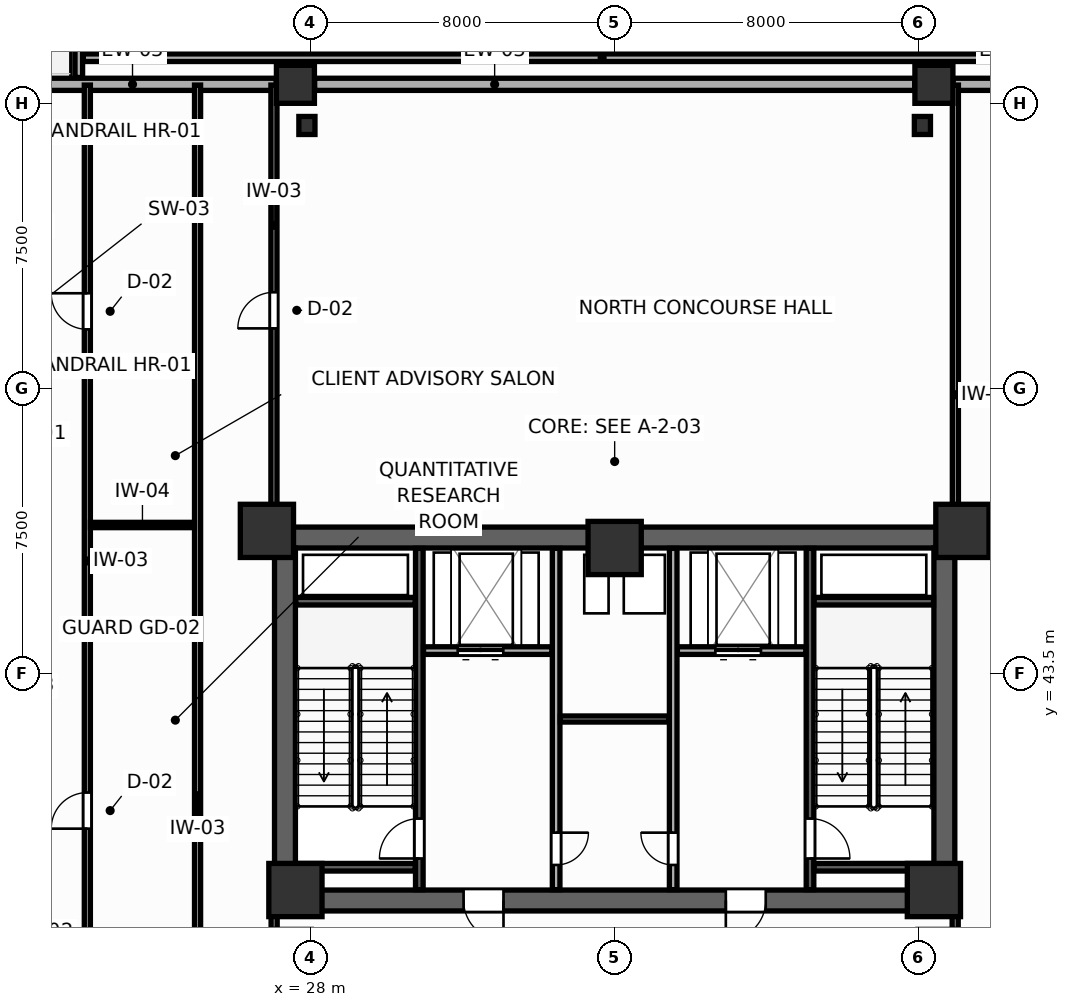
"""IFC4 building model, lengths in metres.
Left out: names, types, materials, properties, quantities, classifications, styles, units other than length and angle.
Written with IfcOpenShell. Run it as: python <this file> out.ifc"""

import sys

from ifc_helpers import new_model, si_unit, direction, frame, frame_2d, origin, origin_2d, place, context, subcontext, project, spatial, rectangle, i_section, extrude, source, transform, mapped, element, fill, save


model = new_model("IFC4")
c1 = context("Model", 3, precision=1e-05, world=origin(), true_north=direction((0.0, 1.0)))
c2 = subcontext(c1, "Body", "Model", "MODEL_VIEW")
j1 = project(units=[si_unit("LENGTHUNIT", "METRE"), si_unit("PLANEANGLEUNIT", "RADIAN")], contexts=[c1])
p1 = place(None, origin())
s1 = spatial("IfcSite", under=j1, at=p1, CompositionType="ELEMENT")
p2 = place(p1, origin())
s2 = spatial("IfcBuilding", under=s1, at=p2, CompositionType="ELEMENT")
p3 = place(p2, origin())
s3 = spatial("IfcBuildingStorey", under=s2, at=p3, CompositionType="ELEMENT", Elevation=0.0)
p4 = place(p3, frame((27.05, 47.075, 0.0), z_axis=(0.0, 0.0, 1.0), x_axis=(1.0, 0.0, 0.0)))
e1 = element("IfcWall", 1, at=p4, inside=s3, PredefinedType="SHEAR", context=c2, shape_type="SweptSolid", body=[
    extrude(rectangle(XDim=17.9, YDim=0.55, at=frame_2d((8.95, 0.0))), origin(), (0.0, 0.0, 1.0), 4.8),
])
p5 = place(p3, frame((27.05, 37.525, 0.0), z_axis=(0.0, 0.0, 1.0), x_axis=(1.0, 0.0, 0.0)))
e2 = element("IfcWall", 2, at=p5, inside=s3, PredefinedType="SHEAR", context=c2, shape_type="SweptSolid", body=[
    extrude(rectangle(XDim=17.9, YDim=0.55, at=frame_2d((8.95, 0.0))), origin(), (0.0, 0.0, 1.0), 4.8),
])
p6 = place(p5, frame((4.975, 0.0, 0.0)))
e3 = element("IfcOpeningElement", 3, at=p6, cuts=e2, PredefinedType="OPENING", context=c2, shape_type="SweptSolid", body=[
    extrude(rectangle(XDim=1.05, YDim=2.1, at=frame_2d((0.525, 1.05))), frame((0.0, 0.285, 0.0), z_axis=(0.0, -1.0, 0.0), x_axis=(1.0, 0.0, 0.0)), (0.0, 0.0, 1.0), 0.57),
])
p7 = place(p5, frame((11.875, 0.0, 0.0)))
e4 = element("IfcOpeningElement", 4, at=p7, cuts=e2, PredefinedType="OPENING", context=c2, shape_type="SweptSolid", body=[
    extrude(rectangle(XDim=1.05, YDim=2.1, at=frame_2d((0.525, 1.05))), frame((0.0, 0.285, 0.0), z_axis=(0.0, -1.0, 0.0), x_axis=(1.0, 0.0, 0.0)), (0.0, 0.0, 1.0), 0.57),
])
for number, where, z_axis, x_axis in (
    (5, (27.325, 37.8, 0.0), (0.0, 0.0, 1.0), (0.0, 1.0, 0.0)),
    (6, (44.675, 37.8, 0.0), (0.0, 0.0, 1.0), (0.0, 1.0, 0.0)),
):
    element("IfcWall", number, at=place(p3, frame(where, z_axis=z_axis, x_axis=x_axis)), inside=s3, PredefinedType="SHEAR", context=c2, shape_type="SweptSolid", body=[
        extrude(rectangle(XDim=9.0, YDim=0.55, at=frame_2d((4.5, 0.0))), origin(), (0.0, 0.0, 1.0), 4.8),
    ])
m1 = source(origin(), c2, "Body", "SweptSolid", [
    extrude(rectangle(XDim=1.4, YDim=1.4, at=origin_2d()), origin(), (0.0, 0.0, 1.0), 4.8),
])
for number, where, z_axis, x_axis in (
    (7, (26.85, 47.25, 0.0), (0.0, 0.0, 1.0), (1.0, 0.0, 0.0)),
    (8, (45.15, 47.25, 0.0), (0.0, 0.0, 1.0), (1.0, 0.0, 0.0)),
    (9, (27.6, 37.8, 0.0), (0.0, 0.0, 1.0), (1.0, 0.0, 0.0)),
    (10, (44.4, 37.8, 0.0), (0.0, 0.0, 1.0), (1.0, 0.0, 0.0)),
    (11, (36.0, 46.8, 0.0), (0.0, 0.0, 1.0), (1.0, 0.0, 0.0)),
):
    element("IfcColumn", number, at=place(p3, frame(where, z_axis=z_axis, x_axis=x_axis)), inside=s3, PredefinedType="COLUMN", context=c2, shape_type="MappedRepresentation", body=[
        mapped(m1, transform((0.0, 0.0, 0.0), scale=1.0)),
    ])
m2 = source(origin(), c2, "Body", "SweptSolid", [
    extrude(rectangle(XDim=1.0, YDim=1.0, at=origin_2d()), origin(), (0.0, 0.0, 1.0), 4.8),
])
for number, where, z_axis, x_axis in (
    (12, (27.6, 59.0, 0.0), (0.0, 0.0, 1.0), (1.0, 0.0, 0.0)),
    (13, (44.4, 59.0, 0.0), (0.0, 0.0, 1.0), (1.0, 0.0, 0.0)),
):
    element("IfcColumn", number, at=place(p3, frame(where, z_axis=z_axis, x_axis=x_axis)), inside=s3, PredefinedType="COLUMN", context=c2, shape_type="MappedRepresentation", body=[
        mapped(m2, transform((0.0, 0.0, 0.0), scale=1.0)),
    ])
m3 = source(origin(), c2, "Body", "SweptSolid", [
    extrude(i_section(OverallWidth=0.424, OverallDepth=0.474, WebThickness=0.045, FlangeThickness=0.072, FilletRadius=0.015, at=origin_2d()), origin(), (0.0, 0.0, 1.0), 4.8),
])
for number, where, z_axis, x_axis in (
    (14, (44.097, 57.917, 0.0), (0.0, 0.0, 1.0), (1.0, 0.0, 0.0)),
    (15, (27.903, 57.917, 0.0), (0.0, 0.0, 1.0), (1.0, 0.0, 0.0)),
):
    element("IfcColumn", number, at=place(p3, frame(where, z_axis=z_axis, x_axis=x_axis)), inside=s3, PredefinedType="COLUMN", context=c2, shape_type="MappedRepresentation", body=[
        mapped(m3, transform((0.0, 0.0, 0.0), scale=1.0)),
    ])
p8 = place(p3, frame((14.505, 59.0, 0.0), z_axis=(0.0, 0.0, 1.0), x_axis=(1.0, 0.0, 0.0)))
e16 = element("IfcWall", 16, at=p8, inside=s3, PredefinedType="SOLIDWALL", context=c2, shape_type="SweptSolid", body=[
    extrude(rectangle(XDim=12.59, YDim=0.32, at=frame_2d((6.295, 0.0))), origin(), (0.0, 0.0, 1.0), 3.82),
])
p9 = place(p8, frame((2.847, 0.0, 0.0)))
e17 = element("IfcOpeningElement", 17, at=p9, cuts=e16, PredefinedType="OPENING", context=c2, shape_type="SweptSolid", body=[
    extrude(rectangle(XDim=2.0, YDim=2.25, at=frame_2d((1.0, 1.125))), frame((0.0, 0.17, 0.0), z_axis=(0.0, -1.0, 0.0), x_axis=(1.0, 0.0, 0.0)), (0.0, 0.0, 1.0), 0.34),
])
p10 = place(p3, frame((28.105, 59.0, 0.0), z_axis=(0.0, 0.0, 1.0), x_axis=(1.0, 0.0, 0.0)))
e18 = element("IfcWall", 18, at=p10, inside=s3, PredefinedType="SOLIDWALL", context=c2, shape_type="SweptSolid", body=[
    extrude(rectangle(XDim=15.79, YDim=0.32, at=frame_2d((7.895, 0.0))), origin(), (0.0, 0.0, 1.0), 3.82),
])
p11 = place(p3, frame((44.905, 59.0, 0.0), z_axis=(0.0, 0.0, 1.0), x_axis=(1.0, 0.0, 0.0)))
e19 = element("IfcWall", 19, at=p11, inside=s3, PredefinedType="SOLIDWALL", context=c2, shape_type="SweptSolid", body=[
    extrude(rectangle(XDim=12.59, YDim=0.32, at=frame_2d((6.295, 0.0))), origin(), (0.0, 0.0, 1.0), 3.82),
])
p12 = place(p11, frame((5.195, 0.0, 0.75)))
e20 = element("IfcOpeningElement", 20, at=p12, cuts=e19, PredefinedType="OPENING", context=c2, shape_type="SweptSolid", body=[
    extrude(rectangle(XDim=2.2, YDim=2.0, at=frame_2d((1.1, 1.0))), frame((0.0, 0.17, 0.0), z_axis=(0.0, -1.0, 0.0), x_axis=(1.0, 0.0, 0.0)), (0.0, 0.0, 1.0), 0.34),
])
p13 = place(p3, frame((30.86, 37.81, 0.0), z_axis=(0.0, 0.0, 1.0), x_axis=(0.0, 1.0, 0.0)))
e21 = element("IfcWall", 21, at=p13, inside=s3, PredefinedType="SHEAR", context=c2, shape_type="SweptSolid", body=[
    extrude(rectangle(XDim=8.98, YDim=0.2, at=frame_2d((4.49, 0.0))), origin(), (0.0, 0.0, 1.0), 4.8),
])
p14 = place(p13, frame((0.82, 0.0, 0.0)))
e22 = element("IfcOpeningElement", 22, at=p14, cuts=e21, PredefinedType="OPENING", context=c2, shape_type="SweptSolid", body=[
    extrude(rectangle(XDim=1.05, YDim=2.1, at=frame_2d((0.525, 1.05))), frame((0.0, 0.11, 0.0), z_axis=(0.0, -1.0, 0.0), x_axis=(1.0, 0.0, 0.0)), (0.0, 0.0, 1.0), 0.22),
])
for number, where, z_axis, x_axis in (
    (23, (27.61, 45.4, 0.0), (0.0, 0.0, 1.0), (1.0, 0.0, 0.0)),
    (24, (27.61, 38.4, 0.0), (0.0, 0.0, 1.0), (1.0, 0.0, 0.0)),
):
    element("IfcWall", number, at=place(p3, frame(where, z_axis=z_axis, x_axis=x_axis)), inside=s3, PredefinedType="SHEAR", context=c2, shape_type="SweptSolid", body=[
        extrude(rectangle(XDim=3.14, YDim=0.2, at=frame_2d((1.57, 0.0))), origin(), (0.0, 0.0, 1.0), 4.8),
    ])
p15 = place(p3, frame((41.14, 37.81, 0.0), z_axis=(0.0, 0.0, 1.0), x_axis=(0.0, 1.0, 0.0)))
e25 = element("IfcWall", 25, at=p15, inside=s3, PredefinedType="SHEAR", context=c2, shape_type="SweptSolid", body=[
    extrude(rectangle(XDim=8.98, YDim=0.2, at=frame_2d((4.49, 0.0))), origin(), (0.0, 0.0, 1.0), 4.8),
])
p16 = place(p15, frame((0.82, 0.0, 0.0)))
e26 = element("IfcOpeningElement", 26, at=p16, cuts=e25, PredefinedType="OPENING", context=c2, shape_type="SweptSolid", body=[
    extrude(rectangle(XDim=1.05, YDim=2.1, at=frame_2d((0.525, 1.05))), frame((0.0, 0.11, 0.0), z_axis=(0.0, -1.0, 0.0), x_axis=(1.0, 0.0, 0.0)), (0.0, 0.0, 1.0), 0.22),
])
for number, where, z_axis, x_axis in (
    (27, (41.25, 45.4, 0.0), (0.0, 0.0, 1.0), (1.0, 0.0, 0.0)),
    (28, (41.25, 38.4, 0.0), (0.0, 0.0, 1.0), (1.0, 0.0, 0.0)),
):
    element("IfcWall", number, at=place(p3, frame(where, z_axis=z_axis, x_axis=x_axis)), inside=s3, PredefinedType="SHEAR", context=c2, shape_type="SweptSolid", body=[
        extrude(rectangle(XDim=3.14, YDim=0.2, at=frame_2d((1.57, 0.0))), origin(), (0.0, 0.0, 1.0), 4.8),
    ])
p17 = place(p3, frame((30.97, 44.1, 0.0), z_axis=(0.0, 0.0, 1.0), x_axis=(1.0, 0.0, 0.0)))
e29 = element("IfcWall", 29, at=p17, inside=s3, PredefinedType="PARTITIONING", context=c2, shape_type="SweptSolid", body=[
    extrude(rectangle(XDim=3.38, YDim=0.2, at=frame_2d((1.69, 0.0))), origin(), (0.0, 0.0, 1.0), 4.52),
])
p18 = place(p17, frame((0.9, 0.0, 0.0)))
e30 = element("IfcOpeningElement", 30, at=p18, cuts=e29, PredefinedType="OPENING", context=c2, shape_type="SweptSolid", body=[
    extrude(rectangle(XDim=1.2, YDim=2.1, at=frame_2d((0.6, 1.05))), frame((0.0, 0.11, 0.0), z_axis=(0.0, -1.0, 0.0), x_axis=(1.0, 0.0, 0.0)), (0.0, 0.0, 1.0), 0.22),
])
p19 = place(p3, frame((37.65, 44.1, 0.0), z_axis=(0.0, 0.0, 1.0), x_axis=(1.0, 0.0, 0.0)))
e31 = element("IfcWall", 31, at=p19, inside=s3, PredefinedType="PARTITIONING", context=c2, shape_type="SweptSolid", body=[
    extrude(rectangle(XDim=3.38, YDim=0.2, at=frame_2d((1.69, 0.0))), origin(), (0.0, 0.0, 1.0), 4.52),
])
p20 = place(p19, frame((1.0, 0.0, 0.0)))
e32 = element("IfcOpeningElement", 32, at=p20, cuts=e31, PredefinedType="OPENING", context=c2, shape_type="SweptSolid", body=[
    extrude(rectangle(XDim=1.2, YDim=2.1, at=frame_2d((0.6, 1.05))), frame((0.0, 0.11, 0.0), z_axis=(0.0, -1.0, 0.0), x_axis=(1.0, 0.0, 0.0)), (0.0, 0.0, 1.0), 0.22),
])
p21 = place(p3, frame((34.46, 37.81, 0.0), z_axis=(0.0, 0.0, 1.0), x_axis=(0.0, 1.0, 0.0)))
e33 = element("IfcWall", 33, at=p21, inside=s3, PredefinedType="PARTITIONING", context=c2, shape_type="SweptSolid", body=[
    extrude(rectangle(XDim=8.98, YDim=0.2, at=frame_2d((4.49, 0.0))), origin(), (0.0, 0.0, 1.0), 4.52),
])
p22 = place(p21, frame((0.65, 0.0, 0.0)))
e34 = element("IfcOpeningElement", 34, at=p22, cuts=e33, PredefinedType="OPENING", context=c2, shape_type="SweptSolid", body=[
    extrude(rectangle(XDim=0.85, YDim=2.05, at=frame_2d((0.425, 1.025))), frame((0.0, 0.11, 0.0), z_axis=(0.0, -1.0, 0.0), x_axis=(1.0, 0.0, 0.0)), (0.0, 0.0, 1.0), 0.22),
])
p23 = place(p3, frame((37.54, 37.81, 0.0), z_axis=(0.0, 0.0, 1.0), x_axis=(0.0, 1.0, 0.0)))
e35 = element("IfcWall", 35, at=p23, inside=s3, PredefinedType="PARTITIONING", context=c2, shape_type="SweptSolid", body=[
    extrude(rectangle(XDim=8.98, YDim=0.2, at=frame_2d((4.49, 0.0))), origin(), (0.0, 0.0, 1.0), 4.52),
])
p24 = place(p23, frame((0.65, 0.0, 0.0)))
e36 = element("IfcOpeningElement", 36, at=p24, cuts=e35, PredefinedType="OPENING", context=c2, shape_type="SweptSolid", body=[
    extrude(rectangle(XDim=0.85, YDim=2.05, at=frame_2d((0.425, 1.025))), frame((0.0, 0.11, 0.0), z_axis=(0.0, -1.0, 0.0), x_axis=(1.0, 0.0, 0.0)), (0.0, 0.0, 1.0), 0.22),
])
p25 = place(p3, frame((34.57, 42.3, 0.0), z_axis=(0.0, 0.0, 1.0), x_axis=(1.0, 0.0, 0.0)))
e37 = element("IfcWall", 37, at=p25, inside=s3, PredefinedType="PARTITIONING", context=c2, shape_type="SweptSolid", body=[
    extrude(rectangle(XDim=2.86, YDim=0.16, at=frame_2d((1.43, 0.0))), origin(), (0.0, 0.0, 1.0), 4.52),
])
p26 = place(p3, frame((27.04, 35.0, 0.0), z_axis=(0.0, 0.0, 1.0), x_axis=(0.0, 1.0, 0.0)))
e38 = element("IfcWall", 38, at=p26, inside=s3, PredefinedType="PARTITIONING", context=c2, shape_type="SweptSolid", body=[
    extrude(rectangle(XDim=2.65, YDim=0.16, at=frame_2d((1.325, 0.0))), origin(), (0.0, 0.0, 1.0), 4.52),
])
p27 = place(p26, frame((0.75, 0.0, 0.0)))
e39 = element("IfcOpeningElement", 39, at=p27, cuts=e38, PredefinedType="OPENING", context=c2, shape_type="SweptSolid", body=[
    extrude(rectangle(XDim=1.05, YDim=2.1, at=frame_2d((0.525, 1.05))), frame((0.0, 0.09, 0.0), z_axis=(0.0, -1.0, 0.0), x_axis=(1.0, 0.0, 0.0)), (0.0, 0.0, 1.0), 0.18),
])
p28 = place(p3, frame((44.96, 35.0, 0.0), z_axis=(0.0, 0.0, 1.0), x_axis=(0.0, 1.0, 0.0)))
e40 = element("IfcWall", 40, at=p28, inside=s3, PredefinedType="PARTITIONING", context=c2, shape_type="SweptSolid", body=[
    extrude(rectangle(XDim=2.65, YDim=0.16, at=frame_2d((1.325, 0.0))), origin(), (0.0, 0.0, 1.0), 4.52),
])
p29 = place(p28, frame((0.75, 0.0, 0.0)))
e41 = element("IfcOpeningElement", 41, at=p29, cuts=e40, PredefinedType="OPENING", context=c2, shape_type="SweptSolid", body=[
    extrude(rectangle(XDim=1.05, YDim=2.1, at=frame_2d((0.525, 1.05))), frame((0.0, 0.09, 0.0), z_axis=(0.0, -1.0, 0.0), x_axis=(1.0, 0.0, 0.0)), (0.0, 0.0, 1.0), 0.18),
])
p30 = place(p3, frame((22.02, 59.7, 0.0), z_axis=(0.0, 0.0, 1.0), x_axis=(1.0, 0.0, 0.0)))
e42 = element("IfcWall", 42, at=p30, inside=s3, PredefinedType="PARTITIONING", context=c2, shape_type="SweptSolid", body=[
    extrude(rectangle(XDim=45.5, YDim=0.2, at=frame_2d((22.75, 0.0))), origin(), (0.0, 0.0, 1.0), 4.52),
])
p31 = place(p3, frame((21.9, 59.18, 0.0), z_axis=(0.0, 0.0, 1.0), x_axis=(0.0, 1.0, 0.0)))
e43 = element("IfcWall", 43, at=p31, inside=s3, PredefinedType="PARTITIONING", context=c2, shape_type="SweptSolid", body=[
    extrude(rectangle(XDim=6.34, YDim=0.2, at=frame_2d((3.17, 0.0))), origin(), (0.0, 0.0, 1.0), 4.52),
])
p32 = place(p3, frame((22.125, 32.27, 0.0), z_axis=(0.0, 0.0, 1.0), x_axis=(0.0, 1.0, 0.0)))
e44 = element("IfcWall", 44, at=p32, inside=s3, PredefinedType="PARTITIONING", context=c2, shape_type="SweptSolid", body=[
    extrude(rectangle(XDim=26.71, YDim=0.16, at=frame_2d((13.355, 0.0))), origin(), (0.0, 0.0, 1.0), 4.52),
])
p33 = place(p32, frame((7.145, 0.0, 0.0)))
e45 = element("IfcOpeningElement", 45, at=p33, cuts=e44, PredefinedType="OPENING", context=c2, shape_type="SweptSolid", body=[
    extrude(rectangle(XDim=0.95, YDim=2.05, at=frame_2d((0.475, 1.025))), frame((0.0, 0.09, 0.0), z_axis=(0.0, -1.0, 0.0), x_axis=(1.0, 0.0, 0.0)), (0.0, 0.0, 1.0), 0.18),
])
p34 = place(p32, frame((20.283, 0.0, 0.0)))
e46 = element("IfcOpeningElement", 46, at=p34, cuts=e44, PredefinedType="OPENING", context=c2, shape_type="SweptSolid", body=[
    extrude(rectangle(XDim=0.95, YDim=2.05, at=frame_2d((0.475, 1.025))), frame((0.0, 0.09, 0.0), z_axis=(0.0, -1.0, 0.0), x_axis=(1.0, 0.0, 0.0)), (0.0, 0.0, 1.0), 0.18),
])
p35 = place(p3, frame((25.025, 32.27, 0.0), z_axis=(0.0, 0.0, 1.0), x_axis=(0.0, 1.0, 0.0)))
e47 = element("IfcWall", 47, at=p35, inside=s3, PredefinedType="PARTITIONING", context=c2, shape_type="SweptSolid", body=[
    extrude(rectangle(XDim=26.71, YDim=0.16, at=frame_2d((13.355, 0.0))), origin(), (0.0, 0.0, 1.0), 4.52),
])
p36 = place(p3, frame((27.035, 47.34, 0.0), z_axis=(0.0, 0.0, 1.0), x_axis=(0.0, 1.0, 0.0)))
e48 = element("IfcWall", 48, at=p36, inside=s3, PredefinedType="PARTITIONING", context=c2, shape_type="SweptSolid", body=[
    extrude(rectangle(XDim=11.64, YDim=0.16, at=frame_2d((5.82, 0.0))), origin(), (0.0, 0.0, 1.0), 4.52),
])
p37 = place(p36, frame((5.238, 0.0, 0.0)))
e49 = element("IfcOpeningElement", 49, at=p37, cuts=e48, PredefinedType="OPENING", context=c2, shape_type="SweptSolid", body=[
    extrude(rectangle(XDim=0.95, YDim=2.05, at=frame_2d((0.475, 1.025))), frame((0.0, 0.09, 0.0), z_axis=(0.0, -1.0, 0.0), x_axis=(1.0, 0.0, 0.0)), (0.0, 0.0, 1.0), 0.18),
])
p38 = place(p3, frame((44.965, 47.34, 0.0), z_axis=(0.0, 0.0, 1.0), x_axis=(0.0, 1.0, 0.0)))
e50 = element("IfcWall", 50, at=p38, inside=s3, PredefinedType="PARTITIONING", context=c2, shape_type="SweptSolid", body=[
    extrude(rectangle(XDim=11.64, YDim=0.16, at=frame_2d((5.82, 0.0))), origin(), (0.0, 0.0, 1.0), 4.52),
])
p39 = place(p3, frame((22.207, 47.405, 0.0), z_axis=(0.0, 0.0, 1.0), x_axis=(1.0, 0.0, 0.0)))
e51 = element("IfcWall", 51, at=p39, inside=s3, PredefinedType="PARTITIONING", context=c2, shape_type="SweptSolid", body=[
    extrude(rectangle(XDim=2.736, YDim=0.14, at=frame_2d((1.368, 0.0))), origin(), (0.0, 0.0, 1.0), 4.52),
])
p40 = place(p14, origin())
e52 = element("IfcDoor", 52, at=p40, inside=s3, OperationType="SINGLE_SWING_LEFT", PredefinedType="DOOR", context=c2, shape_type="SweptSolid", body=[
    extrude(rectangle(XDim=1.05, YDim=2.1, at=frame_2d((0.525, 1.05))), frame((0.0, 0.025, 0.0), z_axis=(0.0, -1.0, 0.0), x_axis=(1.0, 0.0, 0.0)), (0.0, 0.0, 1.0), 0.05),
])
fill(e22, e52)
p41 = place(p16, frame((1.05, 0.0, 0.0), z_axis=(0.0, 0.0, 1.0), x_axis=(-1.0, 0.0, 0.0)))
e53 = element("IfcDoor", 53, at=p41, inside=s3, OperationType="SINGLE_SWING_RIGHT", PredefinedType="DOOR", context=c2, shape_type="SweptSolid", body=[
    extrude(rectangle(XDim=1.05, YDim=2.1, at=frame_2d((0.525, 1.05))), frame((0.0, 0.025, 0.0), z_axis=(0.0, -1.0, 0.0), x_axis=(1.0, 0.0, 0.0)), (0.0, 0.0, 1.0), 0.05),
])
fill(e26, e53)
p42 = place(p18, origin())
e54 = element("IfcDoor", 54, at=p42, inside=s3, OperationType="DOUBLE_DOOR_SLIDING", PredefinedType="DOOR", context=c2, shape_type="SweptSolid", body=[
    extrude(rectangle(XDim=1.2, YDim=2.1, at=frame_2d((0.6, 1.05))), frame((0.0, 0.025, 0.0), z_axis=(0.0, -1.0, 0.0), x_axis=(1.0, 0.0, 0.0)), (0.0, 0.0, 1.0), 0.05),
])
fill(e30, e54)
p43 = place(p20, origin())
e55 = element("IfcDoor", 55, at=p43, inside=s3, OperationType="DOUBLE_DOOR_SLIDING", PredefinedType="DOOR", context=c2, shape_type="SweptSolid", body=[
    extrude(rectangle(XDim=1.2, YDim=2.1, at=frame_2d((0.6, 1.05))), frame((0.0, 0.025, 0.0), z_axis=(0.0, -1.0, 0.0), x_axis=(1.0, 0.0, 0.0)), (0.0, 0.0, 1.0), 0.05),
])
fill(e32, e55)
p44 = place(p22, frame((0.85, 0.0, 0.0), z_axis=(0.0, 0.0, 1.0), x_axis=(-1.0, 0.0, 0.0)))
e56 = element("IfcDoor", 56, at=p44, inside=s3, OperationType="SINGLE_SWING_LEFT", PredefinedType="DOOR", context=c2, shape_type="SweptSolid", body=[
    extrude(rectangle(XDim=0.85, YDim=2.05, at=frame_2d((0.425, 1.025))), frame((0.0, 0.025, 0.0), z_axis=(0.0, -1.0, 0.0), x_axis=(1.0, 0.0, 0.0)), (0.0, 0.0, 1.0), 0.05),
])
fill(e34, e56)
p45 = place(p24, origin())
e57 = element("IfcDoor", 57, at=p45, inside=s3, OperationType="SINGLE_SWING_RIGHT", PredefinedType="DOOR", context=c2, shape_type="SweptSolid", body=[
    extrude(rectangle(XDim=0.85, YDim=2.05, at=frame_2d((0.425, 1.025))), frame((0.0, 0.025, 0.0), z_axis=(0.0, -1.0, 0.0), x_axis=(1.0, 0.0, 0.0)), (0.0, 0.0, 1.0), 0.05),
])
fill(e36, e57)
p46 = place(p33, origin())
e58 = element("IfcDoor", 58, at=p46, inside=s3, OperationType="SINGLE_SWING_LEFT", PredefinedType="DOOR", context=c2, shape_type="SweptSolid", body=[
    extrude(rectangle(XDim=0.95, YDim=2.05, at=frame_2d((0.475, 1.025))), frame((0.0, 0.025, 0.0), z_axis=(0.0, -1.0, 0.0), x_axis=(1.0, 0.0, 0.0)), (0.0, 0.0, 1.0), 0.05),
])
fill(e45, e58)
p47 = place(p34, origin())
e59 = element("IfcDoor", 59, at=p47, inside=s3, OperationType="SINGLE_SWING_RIGHT", PredefinedType="DOOR", context=c2, shape_type="SweptSolid", body=[
    extrude(rectangle(XDim=0.95, YDim=2.05, at=frame_2d((0.475, 1.025))), frame((0.0, 0.025, 0.0), z_axis=(0.0, -1.0, 0.0), x_axis=(1.0, 0.0, 0.0)), (0.0, 0.0, 1.0), 0.05),
])
fill(e46, e59)
p48 = place(p37, origin())
e60 = element("IfcDoor", 60, at=p48, inside=s3, OperationType="SINGLE_SWING_LEFT", PredefinedType="DOOR", context=c2, shape_type="SweptSolid", body=[
    extrude(rectangle(XDim=0.95, YDim=2.05, at=frame_2d((0.475, 1.025))), frame((0.0, 0.025, 0.0), z_axis=(0.0, -1.0, 0.0), x_axis=(1.0, 0.0, 0.0)), (0.0, 0.0, 1.0), 0.05),
])
fill(e49, e60)
p49 = place(p6, frame((1.05, 0.0, 0.0), z_axis=(0.0, 0.0, 1.0), x_axis=(-1.0, 0.0, 0.0)))
e61 = element("IfcDoor", 61, at=p49, inside=s3, OperationType="SINGLE_SWING_LEFT", PredefinedType="DOOR", context=c2, shape_type="SweptSolid", body=[
    extrude(rectangle(XDim=1.05, YDim=2.1, at=frame_2d((0.525, 1.05))), frame((0.0, 0.025, 0.0), z_axis=(0.0, -1.0, 0.0), x_axis=(1.0, 0.0, 0.0)), (0.0, 0.0, 1.0), 0.05),
])
fill(e3, e61)
p50 = place(p7, frame((1.05, 0.0, 0.0), z_axis=(0.0, 0.0, 1.0), x_axis=(-1.0, 0.0, 0.0)))
e62 = element("IfcDoor", 62, at=p50, inside=s3, OperationType="SINGLE_SWING_RIGHT", PredefinedType="DOOR", context=c2, shape_type="SweptSolid", body=[
    extrude(rectangle(XDim=1.05, YDim=2.1, at=frame_2d((0.525, 1.05))), frame((0.0, 0.025, 0.0), z_axis=(0.0, -1.0, 0.0), x_axis=(1.0, 0.0, 0.0)), (0.0, 0.0, 1.0), 0.05),
])
fill(e4, e62)
save(model, sys.argv[1])
